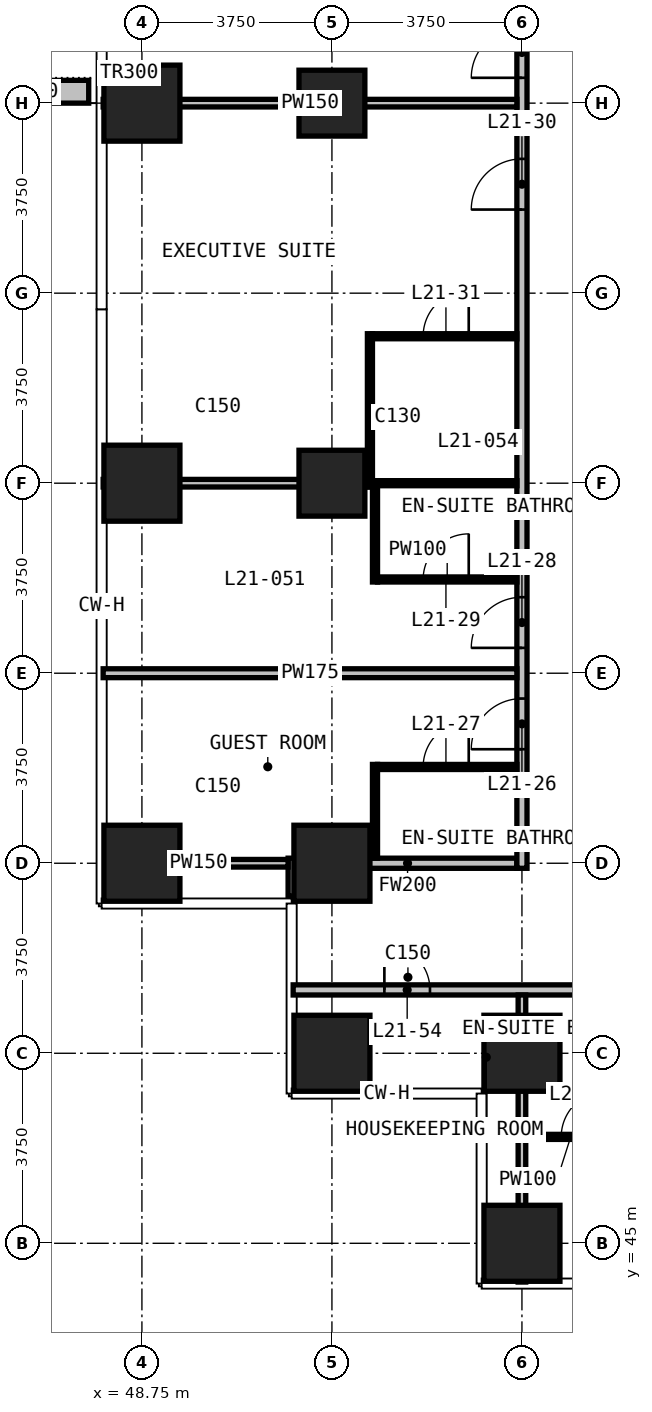
"""IFC4 building model, lengths in metres.
Left out: names, types, materials, properties, quantities, classifications, styles, units other than length and angle.
Written with IfcOpenShell. Run it as: python <this file> out.ifc"""

import sys

from ifc_helpers import new_model, si_unit, direction, frame, frame_2d, origin, origin_2d, place, context, subcontext, project, spatial, rectangle, extrude, element, fill, save


model = new_model("IFC4")
c1 = context("Model", 3, precision=1e-05, world=origin(), true_north=direction((0.0, 1.0)))
c2 = subcontext(c1, "Body", "Model", "MODEL_VIEW")
j1 = project(units=[si_unit("LENGTHUNIT", "METRE"), si_unit("PLANEANGLEUNIT", "RADIAN")], contexts=[c1])
p1 = place(None, origin())
s1 = spatial("IfcSite", under=j1, at=p1, CompositionType="ELEMENT")
p2 = place(p1, origin())
s2 = spatial("IfcBuilding", under=s1, at=p2, CompositionType="ELEMENT")
p3 = place(p2, frame((0.0, 0.0, 89.0)))
s3 = spatial("IfcBuildingStorey", under=s2, at=p3, CompositionType="ELEMENT", Elevation=89.0)
for number, where, z_axis, x_axis in (
    (1, (48.75, 52.5, 0.0), (0.0, 0.0, 1.0), (1.0, 0.0, 0.0)),
    (2, (48.75, 60.0, 0.0), (0.0, 0.0, 1.0), (1.0, 0.0, 0.0)),
    (3, (48.75, 67.5, 0.0), (0.0, 0.0, 1.0), (1.0, 0.0, 0.0)),
    (4, (52.5, 48.75, 0.0), (0.0, 0.0, 1.0), (1.0, 0.0, 0.0)),
    (5, (52.5, 52.5, 0.0), (0.0, 0.0, 1.0), (1.0, 0.0, 0.0)),
):
    element("IfcColumn", number, at=place(p3, frame(where, z_axis=z_axis, x_axis=x_axis)), inside=s3, PredefinedType="COLUMN", context=c2, shape_type="SweptSolid", body=[
        extrude(rectangle(XDim=1.5, YDim=1.5, at=origin_2d()), origin(), (0.0, 0.0, 1.0), 3.3),
    ])
for number, where, z_axis, x_axis in (
    (6, (52.5, 60.0, 0.0), (0.0, 0.0, 1.0), (1.0, 0.0, 0.0)),
    (7, (52.5, 67.5, 0.0), (0.0, 0.0, 1.0), (1.0, 0.0, 0.0)),
):
    element("IfcColumn", number, at=place(p3, frame(where, z_axis=z_axis, x_axis=x_axis)), inside=s3, PredefinedType="COLUMN", context=c2, shape_type="SweptSolid", body=[
        extrude(rectangle(XDim=1.3, YDim=1.3, at=origin_2d()), origin(), (0.0, 0.0, 1.0), 3.3),
    ])
for number, where, z_axis, x_axis in (
    (8, (56.25, 45.0, 0.0), (0.0, 0.0, 1.0), (1.0, 0.0, 0.0)),
    (9, (56.25, 48.75, 0.0), (0.0, 0.0, 1.0), (1.0, 0.0, 0.0)),
):
    element("IfcColumn", number, at=place(p3, frame(where, z_axis=z_axis, x_axis=x_axis)), inside=s3, PredefinedType="COLUMN", context=c2, shape_type="SweptSolid", body=[
        extrude(rectangle(XDim=1.5, YDim=1.5, at=origin_2d()), origin(), (0.0, 0.0, 1.0), 3.3),
    ])
p4 = place(p3, frame((47.7, 67.725, 0.0), z_axis=(0.0, 0.0, 1.0), x_axis=(-1.0, 0.0, 0.0)))
e10 = element("IfcWall", 10, at=p4, inside=s3, PredefinedType="USERDEFINED", context=c2, shape_type="SweptSolid", body=[
    extrude(rectangle(XDim=2.35, YDim=0.45, at=frame_2d((1.175, 0.0))), origin(), (0.0, 0.0, 1.0), 1.1),
])
p5 = place(p3, frame((51.735, 50.0, 0.0), z_axis=(0.0, 0.0, 1.0), x_axis=(1.0, 0.0, 0.0)))
e11 = element("IfcWall", 11, at=p5, inside=s3, PredefinedType="PARTITIONING", context=c2, shape_type="SweptSolid", body=[
    extrude(rectangle(XDim=46.53, YDim=0.2, at=frame_2d((23.265, 0.0))), origin(), (0.0, 0.0, 1.0), 3.0),
])
p6 = place(p5, frame((6.765, 0.0, 0.0)))
e12 = element("IfcOpeningElement", 12, at=p6, cuts=e11, PredefinedType="OPENING", context=c2, shape_type="SweptSolid", body=[
    extrude(rectangle(XDim=1.0, YDim=2.2, at=frame_2d((0.5, 1.1))), frame((0.0, 0.11, 0.0), z_axis=(0.0, -1.0, 0.0), x_axis=(1.0, 0.0, 0.0)), (0.0, 0.0, 1.0), 0.22),
])
p7 = place(p5, frame((10.515, 0.0, 0.0)))
e13 = element("IfcOpeningElement", 13, at=p7, cuts=e11, PredefinedType="OPENING", context=c2, shape_type="SweptSolid", body=[
    extrude(rectangle(XDim=1.0, YDim=2.2, at=frame_2d((0.5, 1.1))), frame((0.0, 0.11, 0.0), z_axis=(0.0, -1.0, 0.0), x_axis=(1.0, 0.0, 0.0)), (0.0, 0.0, 1.0), 0.22),
])
p8 = place(p5, frame((12.515, 0.0, 0.0)))
e14 = element("IfcOpeningElement", 14, at=p8, cuts=e11, PredefinedType="OPENING", context=c2, shape_type="SweptSolid", body=[
    extrude(rectangle(XDim=1.0, YDim=2.2, at=frame_2d((0.5, 1.1))), frame((0.0, 0.11, 0.0), z_axis=(0.0, -1.0, 0.0), x_axis=(1.0, 0.0, 0.0)), (0.0, 0.0, 1.0), 0.22),
])
p9 = place(p5, frame((18.015, 0.0, 0.0)))
e15 = element("IfcOpeningElement", 15, at=p9, cuts=e11, PredefinedType="OPENING", context=c2, shape_type="SweptSolid", body=[
    extrude(rectangle(XDim=1.0, YDim=2.2, at=frame_2d((0.5, 1.1))), frame((0.0, 0.11, 0.0), z_axis=(0.0, -1.0, 0.0), x_axis=(1.0, 0.0, 0.0)), (0.0, 0.0, 1.0), 0.22),
])
p10 = place(p5, frame((20.015, 0.0, 0.0)))
e16 = element("IfcOpeningElement", 16, at=p10, cuts=e11, PredefinedType="OPENING", context=c2, shape_type="SweptSolid", body=[
    extrude(rectangle(XDim=1.0, YDim=2.2, at=frame_2d((0.5, 1.1))), frame((0.0, 0.11, 0.0), z_axis=(0.0, -1.0, 0.0), x_axis=(1.0, 0.0, 0.0)), (0.0, 0.0, 1.0), 0.22),
])
p11 = place(p5, frame((25.515, 0.0, 0.0)))
e17 = element("IfcOpeningElement", 17, at=p11, cuts=e11, PredefinedType="OPENING", context=c2, shape_type="SweptSolid", body=[
    extrude(rectangle(XDim=1.0, YDim=2.2, at=frame_2d((0.5, 1.1))), frame((0.0, 0.11, 0.0), z_axis=(0.0, -1.0, 0.0), x_axis=(1.0, 0.0, 0.0)), (0.0, 0.0, 1.0), 0.22),
])
p12 = place(p5, frame((27.515, 0.0, 0.0)))
e18 = element("IfcOpeningElement", 18, at=p12, cuts=e11, PredefinedType="OPENING", context=c2, shape_type="SweptSolid", body=[
    extrude(rectangle(XDim=1.0, YDim=2.2, at=frame_2d((0.5, 1.1))), frame((0.0, 0.11, 0.0), z_axis=(0.0, -1.0, 0.0), x_axis=(1.0, 0.0, 0.0)), (0.0, 0.0, 1.0), 0.22),
])
p13 = place(p5, frame((33.015, 0.0, 0.0)))
e19 = element("IfcOpeningElement", 19, at=p13, cuts=e11, PredefinedType="OPENING", context=c2, shape_type="SweptSolid", body=[
    extrude(rectangle(XDim=1.0, YDim=2.2, at=frame_2d((0.5, 1.1))), frame((0.0, 0.11, 0.0), z_axis=(0.0, -1.0, 0.0), x_axis=(1.0, 0.0, 0.0)), (0.0, 0.0, 1.0), 0.22),
])
p14 = place(p5, frame((35.015, 0.0, 0.0)))
e20 = element("IfcOpeningElement", 20, at=p14, cuts=e11, PredefinedType="OPENING", context=c2, shape_type="SweptSolid", body=[
    extrude(rectangle(XDim=1.0, YDim=2.2, at=frame_2d((0.5, 1.1))), frame((0.0, 0.11, 0.0), z_axis=(0.0, -1.0, 0.0), x_axis=(1.0, 0.0, 0.0)), (0.0, 0.0, 1.0), 0.22),
])
p15 = place(p5, frame((38.765, 0.0, 0.0)))
e21 = element("IfcOpeningElement", 21, at=p15, cuts=e11, PredefinedType="OPENING", context=c2, shape_type="SweptSolid", body=[
    extrude(rectangle(XDim=1.0, YDim=2.2, at=frame_2d((0.5, 1.1))), frame((0.0, 0.11, 0.0), z_axis=(0.0, -1.0, 0.0), x_axis=(1.0, 0.0, 0.0)), (0.0, 0.0, 1.0), 0.22),
])
p16 = place(p5, frame((1.8, 0.0, 0.0)))
e22 = element("IfcOpeningElement", 22, at=p16, cuts=e11, PredefinedType="OPENING", context=c2, shape_type="SweptSolid", body=[
    extrude(rectangle(XDim=0.9, YDim=2.2, at=frame_2d((0.45, 1.1))), frame((0.0, 0.11, 0.0), z_axis=(0.0, -1.0, 0.0), x_axis=(1.0, 0.0, 0.0)), (0.0, 0.0, 1.0), 0.22),
])
p17 = place(p5, frame((43.815, 0.0, 0.0)))
e23 = element("IfcOpeningElement", 23, at=p17, cuts=e11, PredefinedType="OPENING", context=c2, shape_type="SweptSolid", body=[
    extrude(rectangle(XDim=0.9, YDim=2.2, at=frame_2d((0.45, 1.1))), frame((0.0, 0.11, 0.0), z_axis=(0.0, -1.0, 0.0), x_axis=(1.0, 0.0, 0.0)), (0.0, 0.0, 1.0), 0.22),
])
p18 = place(p3, frame((51.835, 52.5, 0.0), z_axis=(0.0, 0.0, 1.0), x_axis=(1.0, 0.0, 0.0)))
e24 = element("IfcWall", 24, at=p18, inside=s3, PredefinedType="PARTITIONING", context=c2, shape_type="SweptSolid", body=[
    extrude(rectangle(XDim=4.315, YDim=0.2, at=frame_2d((2.157, 0.0))), origin(), (0.0, 0.0, 1.0), 3.0),
])
p19 = place(p3, frame((51.735, 51.855, 0.0), z_axis=(0.0, 0.0, 1.0), x_axis=(0.0, 1.0, 0.0)))
e25 = element("IfcWall", 25, at=p19, inside=s3, PredefinedType="PARTITIONING", context=c2, shape_type="SweptSolid", body=[
    extrude(rectangle(XDim=0.745, YDim=0.2, at=frame_2d((0.373, 0.0))), origin(), (0.0, 0.0, 1.0), 3.0),
])
p20 = place(p3, frame((56.25, 52.4, 0.0), z_axis=(0.0, 0.0, 1.0), x_axis=(0.0, 1.0, 0.0)))
e26 = element("IfcWall", 26, at=p20, inside=s3, PredefinedType="PARTITIONING", context=c2, shape_type="SweptSolid", body=[
    extrude(rectangle(XDim=38.31, YDim=0.2, at=frame_2d((19.155, 0.0))), origin(), (0.0, 0.0, 1.0), 3.0),
])
p21 = place(p20, frame((2.35, 0.0, 0.0)))
e27 = element("IfcOpeningElement", 27, at=p21, cuts=e26, PredefinedType="OPENING", context=c2, shape_type="SweptSolid", body=[
    extrude(rectangle(XDim=1.0, YDim=2.2, at=frame_2d((0.5, 1.1))), frame((0.0, 0.11, 0.0), z_axis=(0.0, -1.0, 0.0), x_axis=(1.0, 0.0, 0.0)), (0.0, 0.0, 1.0), 0.22),
])
p22 = place(p20, frame((4.35, 0.0, 0.0)))
e28 = element("IfcOpeningElement", 28, at=p22, cuts=e26, PredefinedType="OPENING", context=c2, shape_type="SweptSolid", body=[
    extrude(rectangle(XDim=1.0, YDim=2.2, at=frame_2d((0.5, 1.1))), frame((0.0, 0.11, 0.0), z_axis=(0.0, -1.0, 0.0), x_axis=(1.0, 0.0, 0.0)), (0.0, 0.0, 1.0), 0.22),
])
p23 = place(p20, frame((13.0, 0.0, 0.0)))
e29 = element("IfcOpeningElement", 29, at=p23, cuts=e26, PredefinedType="OPENING", context=c2, shape_type="SweptSolid", body=[
    extrude(rectangle(XDim=1.0, YDim=2.2, at=frame_2d((0.5, 1.1))), frame((0.0, 0.11, 0.0), z_axis=(0.0, -1.0, 0.0), x_axis=(1.0, 0.0, 0.0)), (0.0, 0.0, 1.0), 0.22),
])
p24 = place(p20, frame((15.6, 0.0, 0.0)))
e30 = element("IfcOpeningElement", 30, at=p24, cuts=e26, PredefinedType="OPENING", context=c2, shape_type="SweptSolid", body=[
    extrude(rectangle(XDim=1.0, YDim=2.2, at=frame_2d((0.5, 1.1))), frame((0.0, 0.11, 0.0), z_axis=(0.0, -1.0, 0.0), x_axis=(1.0, 0.0, 0.0)), (0.0, 0.0, 1.0), 0.22),
])
p25 = place(p20, frame((21.1, 0.0, 0.0)))
e31 = element("IfcOpeningElement", 31, at=p25, cuts=e26, PredefinedType="OPENING", context=c2, shape_type="SweptSolid", body=[
    extrude(rectangle(XDim=1.0, YDim=2.2, at=frame_2d((0.5, 1.1))), frame((0.0, 0.11, 0.0), z_axis=(0.0, -1.0, 0.0), x_axis=(1.0, 0.0, 0.0)), (0.0, 0.0, 1.0), 0.22),
])
p26 = place(p20, frame((23.7, 0.0, 0.0)))
e32 = element("IfcOpeningElement", 32, at=p26, cuts=e26, PredefinedType="OPENING", context=c2, shape_type="SweptSolid", body=[
    extrude(rectangle(XDim=1.0, YDim=2.2, at=frame_2d((0.5, 1.1))), frame((0.0, 0.11, 0.0), z_axis=(0.0, -1.0, 0.0), x_axis=(1.0, 0.0, 0.0)), (0.0, 0.0, 1.0), 0.22),
])
p27 = place(p20, frame((31.55, 0.0, 0.0)))
e33 = element("IfcOpeningElement", 33, at=p27, cuts=e26, PredefinedType="OPENING", context=c2, shape_type="SweptSolid", body=[
    extrude(rectangle(XDim=0.9, YDim=2.2, at=frame_2d((0.45, 1.1))), frame((0.0, 0.11, 0.0), z_axis=(0.0, -1.0, 0.0), x_axis=(1.0, 0.0, 0.0)), (0.0, 0.0, 1.0), 0.22),
])
p28 = place(p20, frame((35.65, 0.0, 0.0)))
e34 = element("IfcOpeningElement", 34, at=p28, cuts=e26, PredefinedType="OPENING", context=c2, shape_type="SweptSolid", body=[
    extrude(rectangle(XDim=0.9, YDim=2.2, at=frame_2d((0.45, 1.1))), frame((0.0, 0.11, 0.0), z_axis=(0.0, -1.0, 0.0), x_axis=(1.0, 0.0, 0.0)), (0.0, 0.0, 1.0), 0.22),
])
p29 = place(p3, frame((47.985, 56.25, 0.0), z_axis=(0.0, 0.0, 1.0), x_axis=(1.0, 0.0, 0.0)))
e35 = element("IfcWall", 35, at=p29, inside=s3, PredefinedType="PARTITIONING", context=c2, shape_type="SweptSolid", body=[
    extrude(rectangle(XDim=8.165, YDim=0.175, at=frame_2d((4.083, 0.0))), origin(), (0.0, 0.0, 1.0), 3.0),
])
p30 = place(p3, frame((48.105, 52.5, 0.0), z_axis=(0.0, 0.0, 1.0), x_axis=(1.0, 0.0, 0.0)))
e36 = element("IfcWall", 36, at=p30, inside=s3, PredefinedType="PARTITIONING", context=c2, shape_type="SweptSolid", body=[
    extrude(rectangle(XDim=3.53, YDim=0.15, at=frame_2d((1.765, 0.0))), origin(), (0.0, 0.0, 1.0), 3.0),
])
p31 = place(p3, frame((47.985, 60.0, 0.0), z_axis=(0.0, 0.0, 1.0), x_axis=(1.0, 0.0, 0.0)))
e37 = element("IfcWall", 37, at=p31, inside=s3, PredefinedType="PARTITIONING", context=c2, shape_type="SweptSolid", body=[
    extrude(rectangle(XDim=5.215, YDim=0.15, at=frame_2d((2.607, 0.0))), origin(), (0.0, 0.0, 1.0), 3.0),
])
p32 = place(p3, frame((47.985, 67.5, 0.0), z_axis=(0.0, 0.0, 1.0), x_axis=(1.0, 0.0, 0.0)))
e38 = element("IfcWall", 38, at=p32, inside=s3, PredefinedType="PARTITIONING", context=c2, shape_type="SweptSolid", body=[
    extrude(rectangle(XDim=8.165, YDim=0.15, at=frame_2d((4.083, 0.0))), origin(), (0.0, 0.0, 1.0), 3.0),
])
p33 = place(p3, frame((56.25, 44.235, 0.0), z_axis=(0.0, 0.0, 1.0), x_axis=(0.0, 1.0, 0.0)))
e39 = element("IfcWall", 39, at=p33, inside=s3, PredefinedType="PARTITIONING", context=c2, shape_type="SweptSolid", body=[
    extrude(rectangle(XDim=5.665, YDim=0.15, at=frame_2d((2.833, 0.0))), origin(), (0.0, 0.0, 1.0), 3.0),
])
p34 = place(p3, frame((56.325, 47.1, 0.0), z_axis=(0.0, 0.0, 1.0), x_axis=(1.0, 0.0, 0.0)))
e40 = element("IfcWall", 40, at=p34, inside=s3, PredefinedType="PARTITIONING", context=c2, shape_type="SweptSolid", body=[
    extrude(rectangle(XDim=1.775, YDim=0.1, at=frame_2d((0.888, 0.0))), origin(), (0.0, 0.0, 1.0), 3.0),
])
p35 = place(p34, frame((0.7, 0.0, 0.0)))
e41 = element("IfcOpeningElement", 41, at=p35, cuts=e40, PredefinedType="OPENING", context=c2, shape_type="SweptSolid", body=[
    extrude(rectangle(XDim=0.9, YDim=2.2, at=frame_2d((0.45, 1.1))), frame((0.0, 0.06, 0.0), z_axis=(0.0, -1.0, 0.0), x_axis=(1.0, 0.0, 0.0)), (0.0, 0.0, 1.0), 0.12),
])
p36 = place(p3, frame((53.4, 54.4, 0.0), z_axis=(0.0, 0.0, 1.0), x_axis=(1.0, 0.0, 0.0)))
e42 = element("IfcWall", 42, at=p36, inside=s3, PredefinedType="PARTITIONING", context=c2, shape_type="SweptSolid", body=[
    extrude(rectangle(XDim=2.75, YDim=0.1, at=frame_2d((1.375, 0.0))), origin(), (0.0, 0.0, 1.0), 3.0),
])
p37 = place(p36, frame((0.9, 0.0, 0.0)))
e43 = element("IfcOpeningElement", 43, at=p37, cuts=e42, PredefinedType="OPENING", context=c2, shape_type="SweptSolid", body=[
    extrude(rectangle(XDim=0.9, YDim=2.2, at=frame_2d((0.45, 1.1))), frame((0.0, 0.06, 0.0), z_axis=(0.0, -1.0, 0.0), x_axis=(1.0, 0.0, 0.0)), (0.0, 0.0, 1.0), 0.12),
])
p38 = place(p3, frame((53.4, 58.1, 0.0), z_axis=(0.0, 0.0, 1.0), x_axis=(1.0, 0.0, 0.0)))
e44 = element("IfcWall", 44, at=p38, inside=s3, PredefinedType="PARTITIONING", context=c2, shape_type="SweptSolid", body=[
    extrude(rectangle(XDim=2.75, YDim=0.1, at=frame_2d((1.375, 0.0))), origin(), (0.0, 0.0, 1.0), 3.0),
])
p39 = place(p38, frame((0.9, 0.0, 0.0)))
e45 = element("IfcOpeningElement", 45, at=p39, cuts=e44, PredefinedType="OPENING", context=c2, shape_type="SweptSolid", body=[
    extrude(rectangle(XDim=0.9, YDim=2.2, at=frame_2d((0.45, 1.1))), frame((0.0, 0.06, 0.0), z_axis=(0.0, -1.0, 0.0), x_axis=(1.0, 0.0, 0.0)), (0.0, 0.0, 1.0), 0.12),
])
p40 = place(p3, frame((53.4, 60.0, 0.0), z_axis=(0.0, 0.0, 1.0), x_axis=(1.0, 0.0, 0.0)))
e46 = element("IfcWall", 46, at=p40, inside=s3, PredefinedType="PARTITIONING", context=c2, shape_type="SweptSolid", body=[
    extrude(rectangle(XDim=2.75, YDim=0.1, at=frame_2d((1.375, 0.0))), origin(), (0.0, 0.0, 1.0), 3.0),
])
p41 = place(p3, frame((53.3, 62.9, 0.0), z_axis=(0.0, 0.0, 1.0), x_axis=(1.0, 0.0, 0.0)))
e47 = element("IfcWall", 47, at=p41, inside=s3, PredefinedType="PARTITIONING", context=c2, shape_type="SweptSolid", body=[
    extrude(rectangle(XDim=2.85, YDim=0.1, at=frame_2d((1.425, 0.0))), origin(), (0.0, 0.0, 1.0), 3.0),
])
p42 = place(p41, frame((1.0, 0.0, 0.0)))
e48 = element("IfcOpeningElement", 48, at=p42, cuts=e47, PredefinedType="OPENING", context=c2, shape_type="SweptSolid", body=[
    extrude(rectangle(XDim=0.9, YDim=2.2, at=frame_2d((0.45, 1.1))), frame((0.0, 0.06, 0.0), z_axis=(0.0, -1.0, 0.0), x_axis=(1.0, 0.0, 0.0)), (0.0, 0.0, 1.0), 0.12),
])
p43 = place(p3, frame((53.25, 59.925, 0.0), z_axis=(0.0, 0.0, 1.0), x_axis=(0.0, 1.0, 0.0)))
e49 = element("IfcWall", 49, at=p43, inside=s3, PredefinedType="PARTITIONING", context=c2, shape_type="SweptSolid", body=[
    extrude(rectangle(XDim=3.025, YDim=0.1, at=frame_2d((1.512, 0.0))), origin(), (0.0, 0.0, 1.0), 3.0),
])
p44 = place(p3, frame((53.35, 52.6, 0.0), z_axis=(0.0, 0.0, 1.0), x_axis=(0.0, 1.0, 0.0)))
e50 = element("IfcWall", 50, at=p44, inside=s3, PredefinedType="PARTITIONING", context=c2, shape_type="SweptSolid", body=[
    extrude(rectangle(XDim=1.85, YDim=0.1, at=frame_2d((0.925, 0.0))), origin(), (0.0, 0.0, 1.0), 3.0),
])
p45 = place(p3, frame((53.35, 58.05, 0.0), z_axis=(0.0, 0.0, 1.0), x_axis=(0.0, 1.0, 0.0)))
e51 = element("IfcWall", 51, at=p45, inside=s3, PredefinedType="PARTITIONING", context=c2, shape_type="SweptSolid", body=[
    extrude(rectangle(XDim=2.0, YDim=0.1, at=frame_2d((1.0, 0.0))), origin(), (0.0, 0.0, 1.0), 3.0),
])
p46 = place(p35, origin())
e52 = element("IfcDoor", 52, at=p46, inside=s3, OperationType="SINGLE_SWING_RIGHT", PredefinedType="DOOR", context=c2, shape_type="SweptSolid", body=[
    extrude(rectangle(XDim=0.9, YDim=2.2, at=frame_2d((0.45, 1.1))), frame((0.0, 0.025, 0.0), z_axis=(0.0, -1.0, 0.0), x_axis=(1.0, 0.0, 0.0)), (0.0, 0.0, 1.0), 0.05),
])
fill(e41, e52)
p47 = place(p21, origin())
e53 = element("IfcDoor", 53, at=p47, inside=s3, OperationType="SINGLE_SWING_LEFT", PredefinedType="DOOR", context=c2, shape_type="SweptSolid", body=[
    extrude(rectangle(XDim=1.0, YDim=2.2, at=frame_2d((0.5, 1.1))), frame((0.0, 0.025, 0.0), z_axis=(0.0, -1.0, 0.0), x_axis=(1.0, 0.0, 0.0)), (0.0, 0.0, 1.0), 0.05),
])
fill(e27, e53)
p48 = place(p37, origin())
e54 = element("IfcDoor", 54, at=p48, inside=s3, OperationType="SINGLE_SWING_RIGHT", PredefinedType="DOOR", context=c2, shape_type="SweptSolid", body=[
    extrude(rectangle(XDim=0.9, YDim=2.2, at=frame_2d((0.45, 1.1))), frame((0.0, 0.025, 0.0), z_axis=(0.0, -1.0, 0.0), x_axis=(1.0, 0.0, 0.0)), (0.0, 0.0, 1.0), 0.05),
])
fill(e43, e54)
p49 = place(p22, origin())
e55 = element("IfcDoor", 55, at=p49, inside=s3, OperationType="SINGLE_SWING_RIGHT", PredefinedType="DOOR", context=c2, shape_type="SweptSolid", body=[
    extrude(rectangle(XDim=1.0, YDim=2.2, at=frame_2d((0.5, 1.1))), frame((0.0, 0.025, 0.0), z_axis=(0.0, -1.0, 0.0), x_axis=(1.0, 0.0, 0.0)), (0.0, 0.0, 1.0), 0.05),
])
fill(e28, e55)
p50 = place(p39, origin())
e56 = element("IfcDoor", 56, at=p50, inside=s3, OperationType="SINGLE_SWING_RIGHT", PredefinedType="DOOR", context=c2, shape_type="SweptSolid", body=[
    extrude(rectangle(XDim=0.9, YDim=2.2, at=frame_2d((0.45, 1.1))), frame((0.0, 0.025, 0.0), z_axis=(0.0, -1.0, 0.0), x_axis=(1.0, 0.0, 0.0)), (0.0, 0.0, 1.0), 0.05),
])
fill(e45, e56)
p51 = place(p23, origin())
e57 = element("IfcDoor", 57, at=p51, inside=s3, OperationType="SINGLE_SWING_LEFT", PredefinedType="DOOR", context=c2, shape_type="SweptSolid", body=[
    extrude(rectangle(XDim=1.0, YDim=2.2, at=frame_2d((0.5, 1.1))), frame((0.0, 0.025, 0.0), z_axis=(0.0, -1.0, 0.0), x_axis=(1.0, 0.0, 0.0)), (0.0, 0.0, 1.0), 0.05),
])
fill(e29, e57)
p52 = place(p42, origin())
e58 = element("IfcDoor", 58, at=p52, inside=s3, OperationType="SINGLE_SWING_RIGHT", PredefinedType="DOOR", context=c2, shape_type="SweptSolid", body=[
    extrude(rectangle(XDim=0.9, YDim=2.2, at=frame_2d((0.45, 1.1))), frame((0.0, 0.025, 0.0), z_axis=(0.0, -1.0, 0.0), x_axis=(1.0, 0.0, 0.0)), (0.0, 0.0, 1.0), 0.05),
])
fill(e48, e58)
p53 = place(p24, origin())
e59 = element("IfcDoor", 59, at=p53, inside=s3, OperationType="SINGLE_SWING_RIGHT", PredefinedType="DOOR", context=c2, shape_type="SweptSolid", body=[
    extrude(rectangle(XDim=1.0, YDim=2.2, at=frame_2d((0.5, 1.1))), frame((0.0, 0.025, 0.0), z_axis=(0.0, -1.0, 0.0), x_axis=(1.0, 0.0, 0.0)), (0.0, 0.0, 1.0), 0.05),
])
fill(e30, e59)
p54 = place(p16, origin())
e60 = element("IfcDoor", 60, at=p54, inside=s3, OperationType="SINGLE_SWING_RIGHT", PredefinedType="DOOR", context=c2, shape_type="SweptSolid", body=[
    extrude(rectangle(XDim=0.9, YDim=2.2, at=frame_2d((0.45, 1.1))), frame((0.0, 0.025, 0.0), z_axis=(0.0, -1.0, 0.0), x_axis=(1.0, 0.0, 0.0)), (0.0, 0.0, 1.0), 0.05),
])
fill(e22, e60)
save(model, sys.argv[1])
